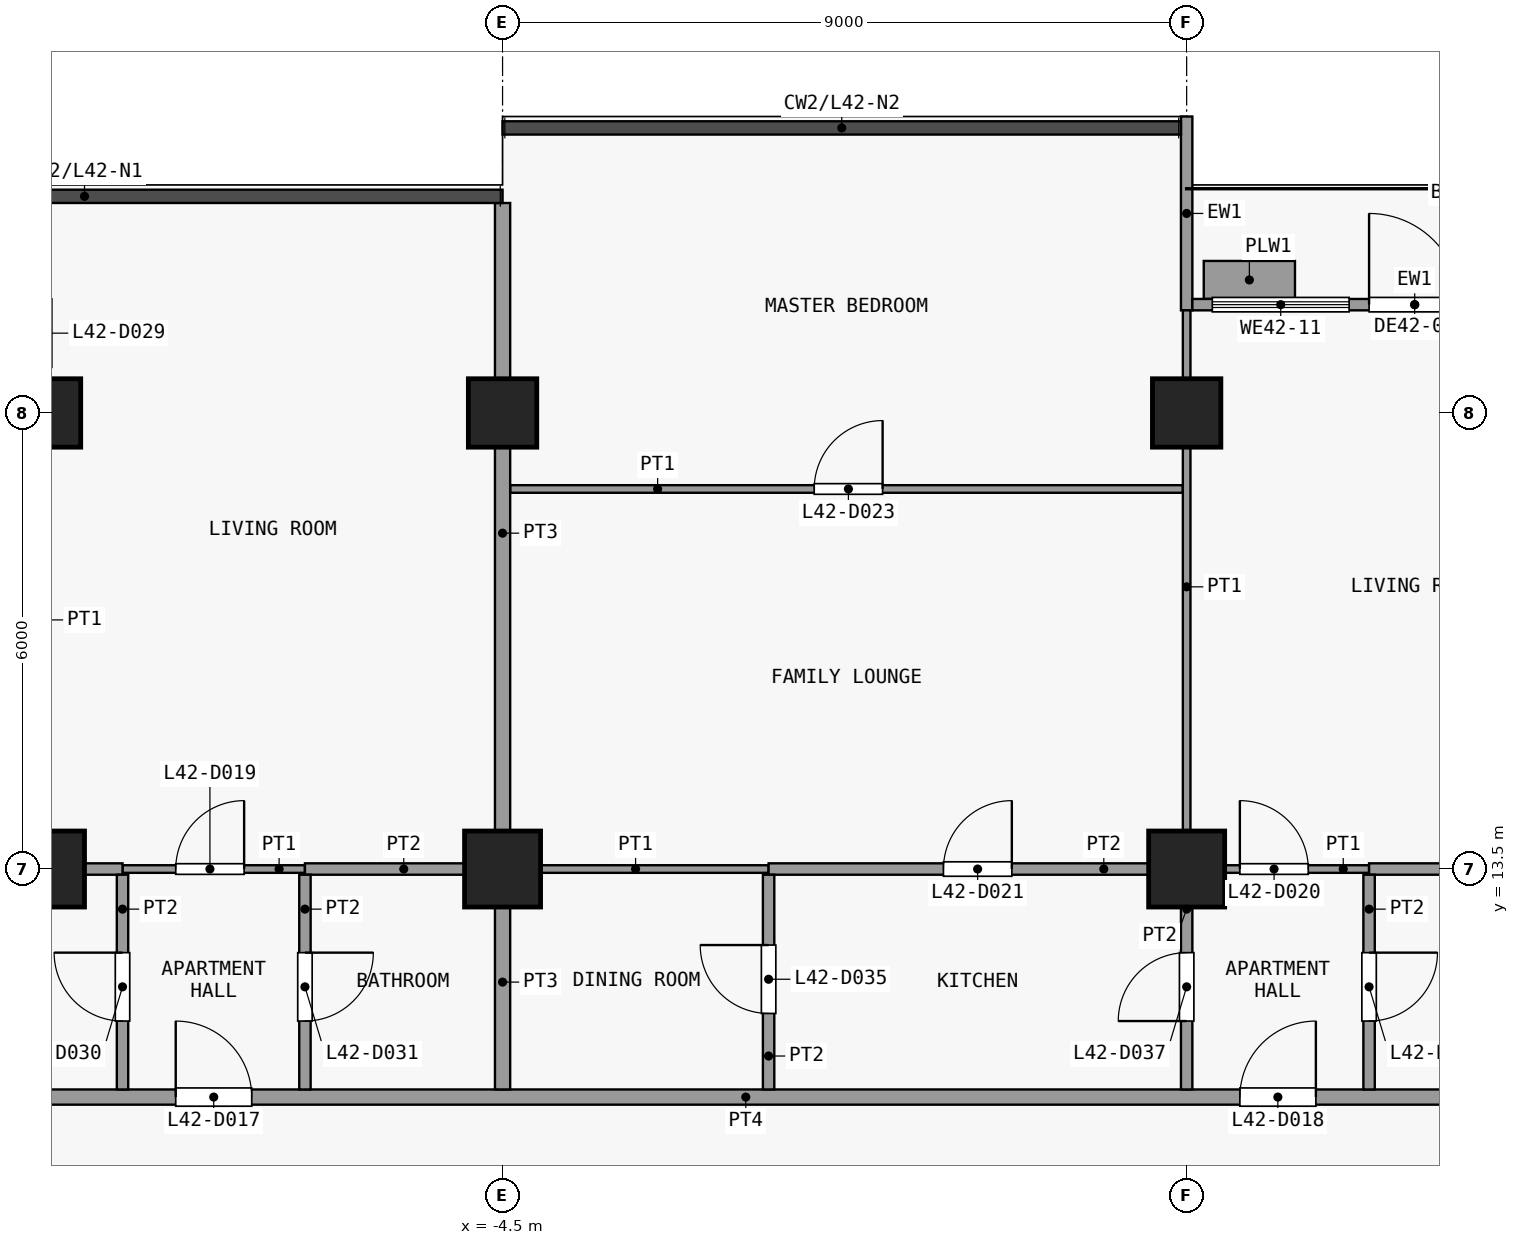
"""IFC4 building model, lengths in metres.
Left out: names, types, materials, properties, quantities, classifications, styles, units other than length and angle.
Written with IfcOpenShell. Run it as: python <this file> out.ifc"""

import sys

from ifc_helpers import new_model, si_unit, direction, frame, frame_2d, origin, origin_2d, place, context, subcontext, project, spatial, rectangle, extrude, element, fill, save


model = new_model("IFC4")
c1 = context("Model", 3, precision=1e-05, world=origin(), true_north=direction((0.0, 1.0)))
c2 = subcontext(c1, "Body", "Model", "MODEL_VIEW")
j1 = project(units=[si_unit("LENGTHUNIT", "METRE"), si_unit("PLANEANGLEUNIT", "RADIAN")], contexts=[c1])
p1 = place(None, origin())
s1 = spatial("IfcSite", under=j1, at=p1, CompositionType="ELEMENT")
p2 = place(p1, origin())
s2 = spatial("IfcBuilding", under=s1, at=p2, CompositionType="ELEMENT")
p3 = place(p2, frame((0.0, 0.0, 170.9)))
s3 = spatial("IfcBuildingStorey", under=s2, at=p3, CompositionType="ELEMENT", Elevation=170.9)
p4 = place(p3, frame((-10.5, 13.5, 0.0), z_axis=(0.0, 0.0, 1.0), x_axis=(1.0, 0.0, 0.0)))
e1 = element("IfcColumn", 1, at=p4, inside=s3, PredefinedType="COLUMN", context=c2, shape_type="SweptSolid", body=[
    extrude(rectangle(XDim=1.0, YDim=1.0, at=origin_2d()), origin(), (0.0, 0.0, 1.0), 3.6),
])
p5 = place(p3, frame((-10.5, 19.5, 0.0), z_axis=(0.0, 0.0, 1.0), x_axis=(1.0, 0.0, 0.0)))
e2 = element("IfcColumn", 2, at=p5, inside=s3, PredefinedType="COLUMN", context=c2, shape_type="SweptSolid", body=[
    extrude(rectangle(XDim=0.9, YDim=0.9, at=origin_2d()), origin(), (0.0, 0.0, 1.0), 3.6),
])
p6 = place(p3, frame((-4.5, 13.5, 0.0), z_axis=(0.0, 0.0, 1.0), x_axis=(1.0, 0.0, 0.0)))
e3 = element("IfcColumn", 3, at=p6, inside=s3, PredefinedType="COLUMN", context=c2, shape_type="SweptSolid", body=[
    extrude(rectangle(XDim=1.0, YDim=1.0, at=origin_2d()), origin(), (0.0, 0.0, 1.0), 3.6),
])
p7 = place(p3, frame((-4.5, 19.5, 0.0), z_axis=(0.0, 0.0, 1.0), x_axis=(1.0, 0.0, 0.0)))
e4 = element("IfcColumn", 4, at=p7, inside=s3, PredefinedType="COLUMN", context=c2, shape_type="SweptSolid", body=[
    extrude(rectangle(XDim=0.9, YDim=0.9, at=origin_2d()), origin(), (0.0, 0.0, 1.0), 3.6),
])
p8 = place(p3, frame((4.5, 13.5, 0.0), z_axis=(0.0, 0.0, 1.0), x_axis=(1.0, 0.0, 0.0)))
e5 = element("IfcColumn", 5, at=p8, inside=s3, PredefinedType="COLUMN", context=c2, shape_type="SweptSolid", body=[
    extrude(rectangle(XDim=1.0, YDim=1.0, at=origin_2d()), origin(), (0.0, 0.0, 1.0), 3.6),
])
p9 = place(p3, frame((4.5, 19.5, 0.0), z_axis=(0.0, 0.0, 1.0), x_axis=(1.0, 0.0, 0.0)))
e6 = element("IfcColumn", 6, at=p9, inside=s3, PredefinedType="COLUMN", context=c2, shape_type="SweptSolid", body=[
    extrude(rectangle(XDim=0.9, YDim=0.9, at=origin_2d()), origin(), (0.0, 0.0, 1.0), 3.6),
])
p10 = place(p3, frame((4.5, 20.85, 0.0), z_axis=(0.0, 0.0, 1.0), x_axis=(0.0, 1.0, 0.0)))
e7 = element("IfcWall", 7, at=p10, inside=s3, PredefinedType="SOLIDWALL", context=c2, shape_type="SweptSolid", body=[
    extrude(rectangle(XDim=2.55, YDim=0.15, at=frame_2d((1.275, 0.0))), origin(), (0.0, 0.0, 1.0), 3.3),
])
p11 = place(p3, frame((4.575, 20.925, 0.0), z_axis=(0.0, 0.0, 1.0), x_axis=(1.0, 0.0, 0.0)))
e8 = element("IfcWall", 8, at=p11, inside=s3, PredefinedType="SOLIDWALL", context=c2, shape_type="SweptSolid", body=[
    extrude(rectangle(XDim=5.85, YDim=0.15, at=frame_2d((2.925, 0.0))), origin(), (0.0, 0.0, 1.0), 3.3),
])
p12 = place(p11, frame((2.325, 0.0, 0.0)))
e9 = element("IfcOpeningElement", 9, at=p12, cuts=e8, PredefinedType="OPENING", context=c2, shape_type="SweptSolid", body=[
    extrude(rectangle(XDim=1.2, YDim=2.4, at=frame_2d((0.6, 1.2))), frame((0.0, 0.085, 0.0), z_axis=(0.0, -1.0, 0.0), x_axis=(1.0, 0.0, 0.0)), (0.0, 0.0, 1.0), 0.17),
])
p13 = place(p11, frame((0.262, 0.0, 0.9)))
e10 = element("IfcOpeningElement", 10, at=p13, cuts=e8, PredefinedType="OPENING", context=c2, shape_type="SweptSolid", body=[
    extrude(rectangle(XDim=1.8, YDim=2.1, at=frame_2d((0.9, 1.05))), frame((0.0, 0.085, 0.0), z_axis=(0.0, -1.0, 0.0), x_axis=(1.0, 0.0, 0.0)), (0.0, 0.0, 1.0), 0.17),
])
p14 = place(p11, frame((3.788, 0.0, 0.9)))
e11 = element("IfcOpeningElement", 11, at=p14, cuts=e8, PredefinedType="OPENING", context=c2, shape_type="SweptSolid", body=[
    extrude(rectangle(XDim=1.8, YDim=2.1, at=frame_2d((0.9, 1.05))), frame((0.0, 0.085, 0.0), z_axis=(0.0, -1.0, 0.0), x_axis=(1.0, 0.0, 0.0)), (0.0, 0.0, 1.0), 0.17),
])
p15 = place(p3, frame((4.725, 21.25, 0.0), z_axis=(0.0, 0.0, 1.0), x_axis=(1.0, 0.0, 0.0)))
e12 = element("IfcWall", 12, at=p15, inside=s3, PredefinedType="USERDEFINED", context=c2, shape_type="SweptSolid", body=[
    extrude(rectangle(XDim=1.2, YDim=0.5, at=frame_2d((0.6, 0.0))), origin(), (0.0, 0.0, 1.0), 0.9),
])
p16 = place(p3, frame((-19.35, 10.5, 0.0), z_axis=(0.0, 0.0, 1.0), x_axis=(1.0, 0.0, 0.0)))
e13 = element("IfcWall", 13, at=p16, inside=s3, PredefinedType="PARTITIONING", context=c2, shape_type="SweptSolid", body=[
    extrude(rectangle(XDim=37.2, YDim=0.2, at=frame_2d((18.6, 0.0))), origin(), (0.0, 0.0, 1.0), 3.3),
])
p17 = place(p16, frame((10.55, 0.0, 0.0)))
e14 = element("IfcOpeningElement", 14, at=p17, cuts=e13, PredefinedType="OPENING", context=c2, shape_type="SweptSolid", body=[
    extrude(rectangle(XDim=1.0, YDim=2.1, at=frame_2d((0.5, 1.05))), frame((0.0, 0.11, 0.0), z_axis=(0.0, -1.0, 0.0), x_axis=(1.0, 0.0, 0.0)), (0.0, 0.0, 1.0), 0.22),
])
p18 = place(p16, frame((24.55, 0.0, 0.0)))
e15 = element("IfcOpeningElement", 15, at=p18, cuts=e13, PredefinedType="OPENING", context=c2, shape_type="SweptSolid", body=[
    extrude(rectangle(XDim=1.0, YDim=2.1, at=frame_2d((0.5, 1.05))), frame((0.0, 0.11, 0.0), z_axis=(0.0, -1.0, 0.0), x_axis=(1.0, 0.0, 0.0)), (0.0, 0.0, 1.0), 0.22),
])
p19 = place(p3, frame((-9.5, 13.5, 0.0), z_axis=(0.0, 0.0, 1.0), x_axis=(1.0, 0.0, 0.0)))
e16 = element("IfcWall", 16, at=p19, inside=s3, PredefinedType="PARTITIONING", context=c2, shape_type="SweptSolid", body=[
    extrude(rectangle(XDim=2.4, YDim=0.1, at=frame_2d((1.2, 0.0))), origin(), (0.0, 0.0, 1.0), 3.3),
])
p20 = place(p19, frame((0.7, 0.0, 0.0)))
e17 = element("IfcOpeningElement", 17, at=p20, cuts=e16, PredefinedType="OPENING", context=c2, shape_type="SweptSolid", body=[
    extrude(rectangle(XDim=0.9, YDim=2.1, at=frame_2d((0.45, 1.05))), frame((0.0, 0.06, 0.0), z_axis=(0.0, -1.0, 0.0), x_axis=(1.0, 0.0, 0.0)), (0.0, 0.0, 1.0), 0.12),
])
p21 = place(p3, frame((-4.5, 13.5, 0.0), z_axis=(0.0, 0.0, 1.0), x_axis=(1.0, 0.0, 0.0)))
e18 = element("IfcWall", 18, at=p21, inside=s3, PredefinedType="PARTITIONING", context=c2, shape_type="SweptSolid", body=[
    extrude(rectangle(XDim=3.5, YDim=0.1, at=frame_2d((1.75, 0.0))), origin(), (0.0, 0.0, 1.0), 3.3),
])
p22 = place(p3, frame((4.5, 13.5, 0.0), z_axis=(0.0, 0.0, 1.0), x_axis=(1.0, 0.0, 0.0)))
e19 = element("IfcWall", 19, at=p22, inside=s3, PredefinedType="PARTITIONING", context=c2, shape_type="SweptSolid", body=[
    extrude(rectangle(XDim=2.4, YDim=0.1, at=frame_2d((1.2, 0.0))), origin(), (0.0, 0.0, 1.0), 3.3),
])
p23 = place(p22, frame((0.7, 0.0, 0.0)))
e20 = element("IfcOpeningElement", 20, at=p23, cuts=e19, PredefinedType="OPENING", context=c2, shape_type="SweptSolid", body=[
    extrude(rectangle(XDim=0.9, YDim=2.1, at=frame_2d((0.45, 1.05))), frame((0.0, 0.06, 0.0), z_axis=(0.0, -1.0, 0.0), x_axis=(1.0, 0.0, 0.0)), (0.0, 0.0, 1.0), 0.12),
])
p24 = place(p3, frame((-16.25, 13.5, 0.0), z_axis=(0.0, 0.0, 1.0), x_axis=(1.0, 0.0, 0.0)))
e21 = element("IfcWall", 21, at=p24, inside=s3, PredefinedType="PARTITIONING", context=c2, shape_type="SweptSolid", body=[
    extrude(rectangle(XDim=6.75, YDim=0.15, at=frame_2d((3.375, 0.0))), origin(), (0.0, 0.0, 1.0), 3.3),
])
p25 = place(p3, frame((-7.1, 13.5, 0.0), z_axis=(0.0, 0.0, 1.0), x_axis=(1.0, 0.0, 0.0)))
e22 = element("IfcWall", 22, at=p25, inside=s3, PredefinedType="PARTITIONING", context=c2, shape_type="SweptSolid", body=[
    extrude(rectangle(XDim=2.6, YDim=0.15, at=frame_2d((1.3, 0.0))), origin(), (0.0, 0.0, 1.0), 3.3),
])
p26 = place(p3, frame((-1.0, 13.5, 0.0), z_axis=(0.0, 0.0, 1.0), x_axis=(1.0, 0.0, 0.0)))
e23 = element("IfcWall", 23, at=p26, inside=s3, PredefinedType="PARTITIONING", context=c2, shape_type="SweptSolid", body=[
    extrude(rectangle(XDim=5.5, YDim=0.15, at=frame_2d((2.75, 0.0))), origin(), (0.0, 0.0, 1.0), 3.3),
])
p27 = place(p26, frame((2.3, 0.0, 0.0)))
e24 = element("IfcOpeningElement", 24, at=p27, cuts=e23, PredefinedType="OPENING", context=c2, shape_type="SweptSolid", body=[
    extrude(rectangle(XDim=0.9, YDim=2.1, at=frame_2d((0.45, 1.05))), frame((0.0, 0.085, 0.0), z_axis=(0.0, -1.0, 0.0), x_axis=(1.0, 0.0, 0.0)), (0.0, 0.0, 1.0), 0.17),
])
p28 = place(p3, frame((6.9, 13.5, 0.0), z_axis=(0.0, 0.0, 1.0), x_axis=(1.0, 0.0, 0.0)))
e25 = element("IfcWall", 25, at=p28, inside=s3, PredefinedType="PARTITIONING", context=c2, shape_type="SweptSolid", body=[
    extrude(rectangle(XDim=6.75, YDim=0.15, at=frame_2d((3.375, 0.0))), origin(), (0.0, 0.0, 1.0), 3.3),
])
p29 = place(p3, frame((-4.4, 18.5, 0.0), z_axis=(0.0, 0.0, 1.0), x_axis=(1.0, 0.0, 0.0)))
e26 = element("IfcWall", 26, at=p29, inside=s3, PredefinedType="PARTITIONING", context=c2, shape_type="SweptSolid", body=[
    extrude(rectangle(XDim=8.85, YDim=0.1, at=frame_2d((4.425, 0.0))), origin(), (0.0, 0.0, 1.0), 3.3),
])
p30 = place(p29, frame((4.0, 0.0, 0.0)))
e27 = element("IfcOpeningElement", 27, at=p30, cuts=e26, PredefinedType="OPENING", context=c2, shape_type="SweptSolid", body=[
    extrude(rectangle(XDim=0.9, YDim=2.1, at=frame_2d((0.45, 1.05))), frame((0.0, 0.06, 0.0), z_axis=(0.0, -1.0, 0.0), x_axis=(1.0, 0.0, 0.0)), (0.0, 0.0, 1.0), 0.12),
])
p31 = place(p3, frame((-9.5, 10.6, 0.0), z_axis=(0.0, 0.0, 1.0), x_axis=(0.0, 1.0, 0.0)))
e28 = element("IfcWall", 28, at=p31, inside=s3, PredefinedType="PARTITIONING", context=c2, shape_type="SweptSolid", body=[
    extrude(rectangle(XDim=2.825, YDim=0.15, at=frame_2d((1.413, 0.0))), origin(), (0.0, 0.0, 1.0), 3.3),
])
p32 = place(p31, frame((0.9, 0.0, 0.0)))
e29 = element("IfcOpeningElement", 29, at=p32, cuts=e28, PredefinedType="OPENING", context=c2, shape_type="SweptSolid", body=[
    extrude(rectangle(XDim=0.9, YDim=2.1, at=frame_2d((0.45, 1.05))), frame((0.0, 0.085, 0.0), z_axis=(0.0, -1.0, 0.0), x_axis=(1.0, 0.0, 0.0)), (0.0, 0.0, 1.0), 0.17),
])
p33 = place(p3, frame((-7.1, 10.6, 0.0), z_axis=(0.0, 0.0, 1.0), x_axis=(0.0, 1.0, 0.0)))
e30 = element("IfcWall", 30, at=p33, inside=s3, PredefinedType="PARTITIONING", context=c2, shape_type="SweptSolid", body=[
    extrude(rectangle(XDim=2.825, YDim=0.15, at=frame_2d((1.413, 0.0))), origin(), (0.0, 0.0, 1.0), 3.3),
])
p34 = place(p33, frame((0.9, 0.0, 0.0)))
e31 = element("IfcOpeningElement", 31, at=p34, cuts=e30, PredefinedType="OPENING", context=c2, shape_type="SweptSolid", body=[
    extrude(rectangle(XDim=0.9, YDim=2.1, at=frame_2d((0.45, 1.05))), frame((0.0, 0.085, 0.0), z_axis=(0.0, -1.0, 0.0), x_axis=(1.0, 0.0, 0.0)), (0.0, 0.0, 1.0), 0.17),
])
p35 = place(p3, frame((-4.5, 10.6, 0.0), z_axis=(0.0, 0.0, 1.0), x_axis=(0.0, 1.0, 0.0)))
e32 = element("IfcWall", 32, at=p35, inside=s3, PredefinedType="PARTITIONING", context=c2, shape_type="SweptSolid", body=[
    extrude(rectangle(XDim=2.825, YDim=0.2, at=frame_2d((1.413, 0.0))), origin(), (0.0, 0.0, 1.0), 3.3),
])
p36 = place(p3, frame((-4.5, 13.575, 0.0), z_axis=(0.0, 0.0, 1.0), x_axis=(0.0, 1.0, 0.0)))
e33 = element("IfcWall", 33, at=p36, inside=s3, PredefinedType="PARTITIONING", context=c2, shape_type="SweptSolid", body=[
    extrude(rectangle(XDim=8.688, YDim=0.2, at=frame_2d((4.344, 0.0))), origin(), (0.0, 0.0, 1.0), 3.3),
])
p37 = place(p3, frame((-1.0, 10.6, 0.0), z_axis=(0.0, 0.0, 1.0), x_axis=(0.0, 1.0, 0.0)))
e34 = element("IfcWall", 34, at=p37, inside=s3, PredefinedType="PARTITIONING", context=c2, shape_type="SweptSolid", body=[
    extrude(rectangle(XDim=2.825, YDim=0.15, at=frame_2d((1.413, 0.0))), origin(), (0.0, 0.0, 1.0), 3.3),
])
p38 = place(p37, frame((1.0, 0.0, 0.0)))
e35 = element("IfcOpeningElement", 35, at=p38, cuts=e34, PredefinedType="OPENING", context=c2, shape_type="SweptSolid", body=[
    extrude(rectangle(XDim=0.9, YDim=2.1, at=frame_2d((0.45, 1.05))), frame((0.0, 0.085, 0.0), z_axis=(0.0, -1.0, 0.0), x_axis=(1.0, 0.0, 0.0)), (0.0, 0.0, 1.0), 0.17),
])
p39 = place(p3, frame((4.5, 13.575, 0.0), z_axis=(0.0, 0.0, 1.0), x_axis=(0.0, 1.0, 0.0)))
e36 = element("IfcWall", 36, at=p39, inside=s3, PredefinedType="PARTITIONING", context=c2, shape_type="SweptSolid", body=[
    extrude(rectangle(XDim=7.275, YDim=0.1, at=frame_2d((3.638, 0.0))), origin(), (0.0, 0.0, 1.0), 3.3),
])
p40 = place(p3, frame((4.5, 10.6, 0.0), z_axis=(0.0, 0.0, 1.0), x_axis=(0.0, 1.0, 0.0)))
e37 = element("IfcWall", 37, at=p40, inside=s3, PredefinedType="PARTITIONING", context=c2, shape_type="SweptSolid", body=[
    extrude(rectangle(XDim=2.825, YDim=0.15, at=frame_2d((1.413, 0.0))), origin(), (0.0, 0.0, 1.0), 3.3),
])
p41 = place(p40, frame((0.9, 0.0, 0.0)))
e38 = element("IfcOpeningElement", 38, at=p41, cuts=e37, PredefinedType="OPENING", context=c2, shape_type="SweptSolid", body=[
    extrude(rectangle(XDim=0.9, YDim=2.1, at=frame_2d((0.45, 1.05))), frame((0.0, 0.085, 0.0), z_axis=(0.0, -1.0, 0.0), x_axis=(1.0, 0.0, 0.0)), (0.0, 0.0, 1.0), 0.17),
])
p42 = place(p3, frame((6.9, 10.6, 0.0), z_axis=(0.0, 0.0, 1.0), x_axis=(0.0, 1.0, 0.0)))
e39 = element("IfcWall", 39, at=p42, inside=s3, PredefinedType="PARTITIONING", context=c2, shape_type="SweptSolid", body=[
    extrude(rectangle(XDim=2.825, YDim=0.15, at=frame_2d((1.413, 0.0))), origin(), (0.0, 0.0, 1.0), 3.3),
])
p43 = place(p42, frame((0.9, 0.0, 0.0)))
e40 = element("IfcOpeningElement", 40, at=p43, cuts=e39, PredefinedType="OPENING", context=c2, shape_type="SweptSolid", body=[
    extrude(rectangle(XDim=0.9, YDim=2.1, at=frame_2d((0.45, 1.05))), frame((0.0, 0.085, 0.0), z_axis=(0.0, -1.0, 0.0), x_axis=(1.0, 0.0, 0.0)), (0.0, 0.0, 1.0), 0.17),
])
p44 = place(p12, origin())
e41 = element("IfcDoor", 41, at=p44, inside=s3, OperationType="SINGLE_SWING_LEFT", PredefinedType="DOOR", context=c2, shape_type="SweptSolid", body=[
    extrude(rectangle(XDim=1.2, YDim=2.4, at=frame_2d((0.6, 1.2))), frame((0.0, 0.025, 0.0), z_axis=(0.0, -1.0, 0.0), x_axis=(1.0, 0.0, 0.0)), (0.0, 0.0, 1.0), 0.05),
])
fill(e9, e41)
p45 = place(p13, origin())
e42 = element("IfcWindow", 42, at=p45, inside=s3, PartitioningType="SINGLE_PANEL", PredefinedType="WINDOW", context=c2, shape_type="SweptSolid", body=[
    extrude(rectangle(XDim=1.8, YDim=2.1, at=frame_2d((0.9, 1.05))), frame((0.0, 0.03, 0.0), z_axis=(0.0, -1.0, 0.0), x_axis=(1.0, 0.0, 0.0)), (0.0, 0.0, 1.0), 0.06),
])
fill(e10, e42)
p46 = place(p17, origin())
e43 = element("IfcDoor", 43, at=p46, inside=s3, OperationType="SINGLE_SWING_RIGHT", PredefinedType="DOOR", context=c2, shape_type="SweptSolid", body=[
    extrude(rectangle(XDim=1.0, YDim=2.1, at=frame_2d((0.5, 1.05))), frame((0.0, 0.025, 0.0), z_axis=(0.0, -1.0, 0.0), x_axis=(1.0, 0.0, 0.0)), (0.0, 0.0, 1.0), 0.05),
])
fill(e14, e43)
p47 = place(p18, origin())
e44 = element("IfcDoor", 44, at=p47, inside=s3, OperationType="SINGLE_SWING_LEFT", PredefinedType="DOOR", context=c2, shape_type="SweptSolid", body=[
    extrude(rectangle(XDim=1.0, YDim=2.1, at=frame_2d((0.5, 1.05))), frame((0.0, 0.025, 0.0), z_axis=(0.0, -1.0, 0.0), x_axis=(1.0, 0.0, 0.0)), (0.0, 0.0, 1.0), 0.05),
])
fill(e15, e44)
p48 = place(p20, origin())
e45 = element("IfcDoor", 45, at=p48, inside=s3, OperationType="SINGLE_SWING_LEFT", PredefinedType="DOOR", context=c2, shape_type="SweptSolid", body=[
    extrude(rectangle(XDim=0.9, YDim=2.1, at=frame_2d((0.45, 1.05))), frame((0.0, 0.025, 0.0), z_axis=(0.0, -1.0, 0.0), x_axis=(1.0, 0.0, 0.0)), (0.0, 0.0, 1.0), 0.05),
])
fill(e17, e45)
p49 = place(p23, origin())
e46 = element("IfcDoor", 46, at=p49, inside=s3, OperationType="SINGLE_SWING_RIGHT", PredefinedType="DOOR", context=c2, shape_type="SweptSolid", body=[
    extrude(rectangle(XDim=0.9, YDim=2.1, at=frame_2d((0.45, 1.05))), frame((0.0, 0.025, 0.0), z_axis=(0.0, -1.0, 0.0), x_axis=(1.0, 0.0, 0.0)), (0.0, 0.0, 1.0), 0.05),
])
fill(e20, e46)
p50 = place(p27, origin())
e47 = element("IfcDoor", 47, at=p50, inside=s3, OperationType="SINGLE_SWING_LEFT", PredefinedType="DOOR", context=c2, shape_type="SweptSolid", body=[
    extrude(rectangle(XDim=0.9, YDim=2.1, at=frame_2d((0.45, 1.05))), frame((0.0, 0.025, 0.0), z_axis=(0.0, -1.0, 0.0), x_axis=(1.0, 0.0, 0.0)), (0.0, 0.0, 1.0), 0.05),
])
fill(e24, e47)
p51 = place(p30, origin())
e48 = element("IfcDoor", 48, at=p51, inside=s3, OperationType="SINGLE_SWING_LEFT", PredefinedType="DOOR", context=c2, shape_type="SweptSolid", body=[
    extrude(rectangle(XDim=0.9, YDim=2.1, at=frame_2d((0.45, 1.05))), frame((0.0, 0.025, 0.0), z_axis=(0.0, -1.0, 0.0), x_axis=(1.0, 0.0, 0.0)), (0.0, 0.0, 1.0), 0.05),
])
fill(e27, e48)
p52 = place(p32, origin())
e49 = element("IfcDoor", 49, at=p52, inside=s3, OperationType="SINGLE_SWING_LEFT", PredefinedType="DOOR", context=c2, shape_type="SweptSolid", body=[
    extrude(rectangle(XDim=0.9, YDim=2.1, at=frame_2d((0.45, 1.05))), frame((0.0, 0.025, 0.0), z_axis=(0.0, -1.0, 0.0), x_axis=(1.0, 0.0, 0.0)), (0.0, 0.0, 1.0), 0.05),
])
fill(e29, e49)
p53 = place(p34, origin())
e50 = element("IfcDoor", 50, at=p53, inside=s3, OperationType="SINGLE_SWING_RIGHT", PredefinedType="DOOR", context=c2, shape_type="SweptSolid", body=[
    extrude(rectangle(XDim=0.9, YDim=2.1, at=frame_2d((0.45, 1.05))), frame((0.0, 0.025, 0.0), z_axis=(0.0, -1.0, 0.0), x_axis=(1.0, 0.0, 0.0)), (0.0, 0.0, 1.0), 0.05),
])
fill(e31, e50)
p54 = place(p38, origin())
e51 = element("IfcDoor", 51, at=p54, inside=s3, OperationType="SINGLE_SWING_LEFT", PredefinedType="DOOR", context=c2, shape_type="SweptSolid", body=[
    extrude(rectangle(XDim=0.9, YDim=2.1, at=frame_2d((0.45, 1.05))), frame((0.0, 0.025, 0.0), z_axis=(0.0, -1.0, 0.0), x_axis=(1.0, 0.0, 0.0)), (0.0, 0.0, 1.0), 0.05),
])
fill(e35, e51)
p55 = place(p41, origin())
e52 = element("IfcDoor", 52, at=p55, inside=s3, OperationType="SINGLE_SWING_RIGHT", PredefinedType="DOOR", context=c2, shape_type="SweptSolid", body=[
    extrude(rectangle(XDim=0.9, YDim=2.1, at=frame_2d((0.45, 1.05))), frame((0.0, 0.025, 0.0), z_axis=(0.0, -1.0, 0.0), x_axis=(1.0, 0.0, 0.0)), (0.0, 0.0, 1.0), 0.05),
])
fill(e38, e52)
p56 = place(p43, origin())
e53 = element("IfcDoor", 53, at=p56, inside=s3, OperationType="SINGLE_SWING_RIGHT", PredefinedType="DOOR", context=c2, shape_type="SweptSolid", body=[
    extrude(rectangle(XDim=0.9, YDim=2.1, at=frame_2d((0.45, 1.05))), frame((0.0, 0.025, 0.0), z_axis=(0.0, -1.0, 0.0), x_axis=(1.0, 0.0, 0.0)), (0.0, 0.0, 1.0), 0.05),
])
fill(e40, e53)
save(model, sys.argv[1])
